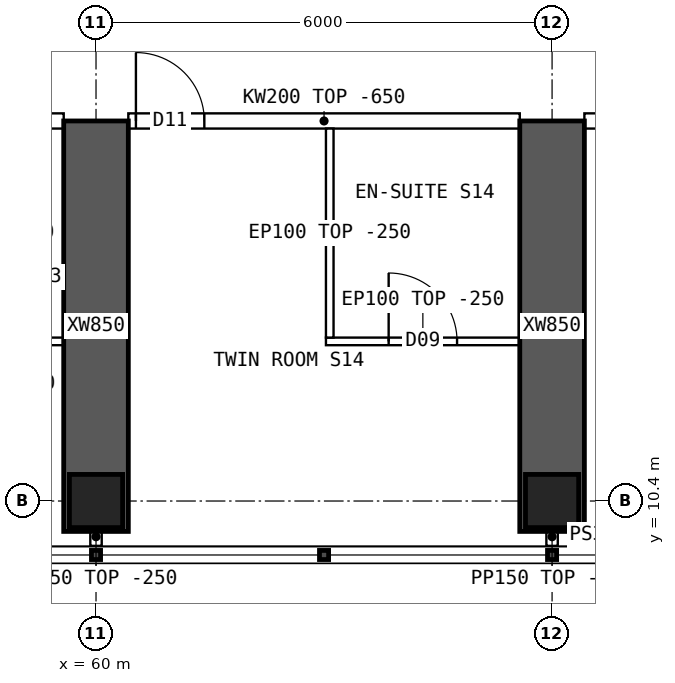
"""IFC4 building model, lengths in metres.
Left out: names, types, materials, properties, quantities, classifications, styles, units other than length and angle.
Written with IfcOpenShell. Run it as: python <this file> out.ifc"""

import sys

from ifc_helpers import new_model, si_unit, direction, frame, frame_2d, origin, origin_2d, place, context, subcontext, project, spatial, polyline, rectangle, hollow_rectangle, outline, extrude, element, fill, save


model = new_model("IFC4")
c1 = context("Model", 3, precision=1e-05, world=origin(), true_north=direction((0.0, 1.0)))
c2 = subcontext(c1, "Body", "Model", "MODEL_VIEW")
j1 = project(units=[si_unit("LENGTHUNIT", "METRE"), si_unit("PLANEANGLEUNIT", "RADIAN")], contexts=[c1])
p1 = place(None, origin())
s1 = spatial("IfcSite", under=j1, at=p1, CompositionType="ELEMENT")
p2 = place(p1, origin())
s2 = spatial("IfcBuilding", under=s1, at=p2, CompositionType="ELEMENT")
p3 = place(p2, frame((0.0, 0.0, 167.35)))
s3 = spatial("IfcBuildingStorey", under=s2, at=p3, CompositionType="ELEMENT", Elevation=167.35)
for number, where, z_axis, x_axis in (
    (1, (60.0, 10.4, 0.0), (0.0, 0.0, 1.0), (1.0, 0.0, 0.0)),
    (2, (66.0, 10.4, 0.0), (0.0, 0.0, 1.0), (1.0, 0.0, 0.0)),
):
    element("IfcColumn", number, at=place(p3, frame(where, z_axis=z_axis, x_axis=x_axis)), inside=s3, PredefinedType="COLUMN", context=c2, shape_type="SweptSolid", body=[
        extrude(hollow_rectangle(XDim=0.7, YDim=0.7, WallThickness=0.07, at=origin_2d()), origin(), (0.0, 0.0, 1.0), 3.75),
    ])
for number, where, z_axis, x_axis in (
    (3, (60.0, 10.0, 0.0), (0.0, 0.0, 1.0), (0.0, 1.0, 0.0)),
    (4, (66.0, 10.0, 0.0), (0.0, 0.0, 1.0), (0.0, 1.0, 0.0)),
):
    element("IfcWall", number, at=place(p3, frame(where, z_axis=z_axis, x_axis=x_axis)), inside=s3, PredefinedType="SHEAR", context=c2, shape_type="SweptSolid", body=[
        extrude(rectangle(XDim=5.4, YDim=0.85, at=frame_2d((2.7, 0.0))), origin(), (0.0, 0.0, 1.0), 3.75),
    ])
p4 = place(p3, frame((66.8, 9.95, 0.0), z_axis=(0.0, 0.0, 1.0), x_axis=(-1.0, 0.0, 0.0)))
e5 = element("IfcWall", 5, at=p4, inside=s3, PredefinedType="SOLIDWALL", context=c2, shape_type="SweptSolid", body=[
    extrude(rectangle(XDim=0.375, YDim=0.3, at=frame_2d((0.188, 0.0))), origin(), (0.0, 0.0, 1.0), 3.5),
])
p5 = place(p3, frame((54.425, 15.4, 0.0), z_axis=(0.0, 0.0, 1.0), x_axis=(1.0, 0.0, 0.0)))
e6 = element("IfcWall", 6, at=p5, inside=s3, PredefinedType="SOLIDWALL", context=c2, shape_type="SweptSolid", body=[
    extrude(outline(polyline([(0.0, 0.0), (5.15, 0.0), (5.15, 3.1), (0.0, 3.1), (0.0, 0.0)])), frame((0.0, 0.1, 0.0), z_axis=(0.0, -1.0, 0.0), x_axis=(1.0, 0.0, 0.0)), (0.0, 0.0, 1.0), 0.2),
])
p6 = place(p5, frame((1.3, 0.0, 0.0)))
e7 = element("IfcOpeningElement", 7, at=p6, cuts=e6, PredefinedType="OPENING", context=c2, shape_type="SweptSolid", body=[
    extrude(rectangle(XDim=0.9, YDim=2.1, at=frame_2d((0.45, 1.05))), frame((0.0, 0.11, 0.0), z_axis=(0.0, -1.0, 0.0), x_axis=(1.0, 0.0, 0.0)), (0.0, 0.0, 1.0), 0.22),
])
p7 = place(p5, frame((2.75, 0.0, 0.0)))
e8 = element("IfcOpeningElement", 8, at=p7, cuts=e6, PredefinedType="OPENING", context=c2, shape_type="SweptSolid", body=[
    extrude(rectangle(XDim=0.9, YDim=2.1, at=frame_2d((0.45, 1.05))), frame((0.0, 0.11, 0.0), z_axis=(0.0, -1.0, 0.0), x_axis=(1.0, 0.0, 0.0)), (0.0, 0.0, 1.0), 0.22),
])
p8 = place(p3, frame((60.425, 15.4, 0.0), z_axis=(0.0, 0.0, 1.0), x_axis=(1.0, 0.0, 0.0)))
e9 = element("IfcWall", 9, at=p8, inside=s3, PredefinedType="SOLIDWALL", context=c2, shape_type="SweptSolid", body=[
    extrude(outline(polyline([(0.0, 0.0), (5.15, 0.0), (5.15, 3.1), (0.0, 3.1), (0.0, 0.0)])), frame((0.0, 0.1, 0.0), z_axis=(0.0, -1.0, 0.0), x_axis=(1.0, 0.0, 0.0)), (0.0, 0.0, 1.0), 0.2),
])
p9 = place(p8, frame((0.1, 0.0, 0.0)))
e10 = element("IfcOpeningElement", 10, at=p9, cuts=e9, PredefinedType="OPENING", context=c2, shape_type="SweptSolid", body=[
    extrude(rectangle(XDim=0.9, YDim=2.1, at=frame_2d((0.45, 1.05))), frame((0.0, 0.11, 0.0), z_axis=(0.0, -1.0, 0.0), x_axis=(1.0, 0.0, 0.0)), (0.0, 0.0, 1.0), 0.22),
])
p10 = place(p3, frame((66.425, 15.4, 0.0), z_axis=(0.0, 0.0, 1.0), x_axis=(1.0, 0.0, 0.0)))
e11 = element("IfcWall", 11, at=p10, inside=s3, PredefinedType="SOLIDWALL", context=c2, shape_type="SweptSolid", body=[
    extrude(rectangle(XDim=1.975, YDim=0.2, at=frame_2d((0.987, 0.0))), origin(), (0.0, 0.0, 1.0), 3.5),
])
p11 = place(p10, frame((0.2, 0.0, 0.0)))
e12 = element("IfcOpeningElement", 12, at=p11, cuts=e11, PredefinedType="OPENING", context=c2, shape_type="SweptSolid", body=[
    extrude(rectangle(XDim=0.9, YDim=2.1, at=frame_2d((0.45, 1.05))), frame((0.0, 0.11, 0.0), z_axis=(0.0, -1.0, 0.0), x_axis=(1.0, 0.0, 0.0)), (0.0, 0.0, 1.0), 0.22),
])
p12 = place(p3, frame((59.575, 12.5, 0.0), z_axis=(0.0, 0.0, 1.0), x_axis=(-1.0, 0.0, 0.0)))
e13 = element("IfcWall", 13, at=p12, inside=s3, PredefinedType="PARTITIONING", context=c2, shape_type="SweptSolid", body=[
    extrude(rectangle(XDim=1.25, YDim=0.1, at=frame_2d((0.625, 0.0))), origin(), (0.0, 0.0, 1.0), 3.5),
])
p13 = place(p12, frame((0.175, 0.0, 0.0)))
e14 = element("IfcOpeningElement", 14, at=p13, cuts=e13, PredefinedType="OPENING", context=c2, shape_type="SweptSolid", body=[
    extrude(rectangle(XDim=0.9, YDim=2.1, at=frame_2d((0.45, 1.05))), frame((0.0, 0.06, 0.0), z_axis=(0.0, -1.0, 0.0), x_axis=(1.0, 0.0, 0.0)), (0.0, 0.0, 1.0), 0.12),
])
p14 = place(p3, frame((65.575, 12.5, 0.0), z_axis=(0.0, 0.0, 1.0), x_axis=(-1.0, 0.0, 0.0)))
e15 = element("IfcWall", 15, at=p14, inside=s3, PredefinedType="PARTITIONING", context=c2, shape_type="SweptSolid", body=[
    extrude(rectangle(XDim=2.55, YDim=0.1, at=frame_2d((1.275, 0.0))), origin(), (0.0, 0.0, 1.0), 3.5),
])
p15 = place(p14, frame((0.825, 0.0, 0.0)))
e16 = element("IfcOpeningElement", 16, at=p15, cuts=e15, PredefinedType="OPENING", context=c2, shape_type="SweptSolid", body=[
    extrude(rectangle(XDim=0.9, YDim=2.1, at=frame_2d((0.45, 1.05))), frame((0.0, 0.06, 0.0), z_axis=(0.0, -1.0, 0.0), x_axis=(1.0, 0.0, 0.0)), (0.0, 0.0, 1.0), 0.12),
])
p16 = place(p3, frame((63.075, 12.55, 0.0), z_axis=(0.0, 0.0, 1.0), x_axis=(0.0, 1.0, 0.0)))
e17 = element("IfcWall", 17, at=p16, inside=s3, PredefinedType="PARTITIONING", context=c2, shape_type="SweptSolid", body=[
    extrude(outline(polyline([(0.0, 0.0), (2.75, 0.0), (2.75, 3.1), (2.702, 3.1), (2.7, 3.5), (0.0, 3.5), (0.0, 0.0)])), frame((0.0, 0.05, 0.0), z_axis=(0.0, -1.0, 0.0), x_axis=(1.0, 0.0, 0.0)), (0.0, 0.0, 1.0), 0.1),
])
for number, where, z_axis, x_axis in (
    (18, (60.0, 10.05, 0.0), (0.0, 0.0, 1.0), (0.0, -1.0, 0.0)),
    (19, (66.0, 10.05, 0.0), (0.0, 0.0, 1.0), (0.0, -1.0, 0.0)),
):
    element("IfcWall", number, at=place(p3, frame(where, z_axis=z_axis, x_axis=x_axis)), inside=s3, PredefinedType="PARTITIONING", context=c2, shape_type="SweptSolid", body=[
        extrude(rectangle(XDim=0.24, YDim=0.15, at=frame_2d((0.12, 0.0))), origin(), (0.0, 0.0, 1.0), 3.5),
    ])
p17 = place(p15, origin())
e20 = element("IfcDoor", 20, at=p17, inside=s3, OperationType="SINGLE_SWING_RIGHT", PredefinedType="DOOR", context=c2, shape_type="SweptSolid", body=[
    extrude(rectangle(XDim=0.9, YDim=2.1, at=frame_2d((0.45, 1.05))), frame((0.0, 0.025, 0.0), z_axis=(0.0, -1.0, 0.0), x_axis=(1.0, 0.0, 0.0)), (0.0, 0.0, 1.0), 0.05),
])
fill(e16, e20)
p18 = place(p9, origin())
e21 = element("IfcDoor", 21, at=p18, inside=s3, OperationType="SINGLE_SWING_LEFT", PredefinedType="DOOR", context=c2, shape_type="SweptSolid", body=[
    extrude(rectangle(XDim=0.9, YDim=2.1, at=frame_2d((0.45, 1.05))), frame((0.0, 0.025, 0.0), z_axis=(0.0, -1.0, 0.0), x_axis=(1.0, 0.0, 0.0)), (0.0, 0.0, 1.0), 0.05),
])
fill(e10, e21)
save(model, sys.argv[1])
